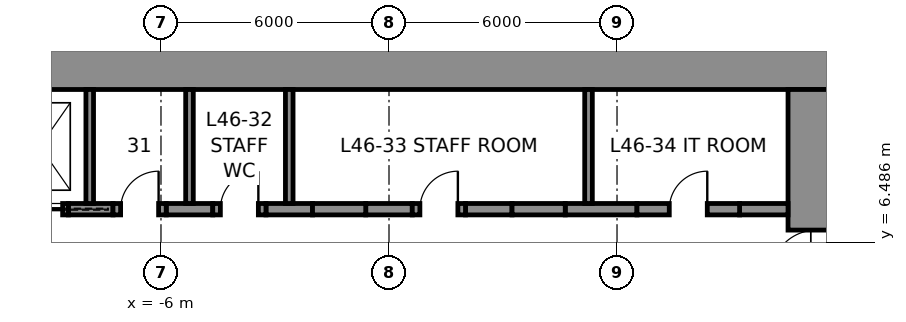
"""IFC4 building model, lengths in metres.
Left out: names, types, materials, properties, quantities, classifications, styles, units other than length and angle.
Written with IfcOpenShell. Run it as: python <this file> out.ifc"""

import sys

from ifc_helpers import new_model, si_unit, direction, frame, frame_2d, origin, place, context, subcontext, project, spatial, rectangle, extrude, element, fill, save


model = new_model("IFC4")
c1 = context("Model", 3, precision=1e-05, world=origin(), true_north=direction((0.0, 1.0)))
c2 = subcontext(c1, "Body", "Model", "MODEL_VIEW")
j1 = project(units=[si_unit("LENGTHUNIT", "METRE"), si_unit("PLANEANGLEUNIT", "RADIAN")], contexts=[c1])
p1 = place(None, origin())
s1 = spatial("IfcSite", under=j1, at=p1, CompositionType="ELEMENT")
p2 = place(p1, origin())
s2 = spatial("IfcBuilding", under=s1, at=p2, CompositionType="ELEMENT")
p3 = place(p2, frame((0.0, 0.0, 213.8)))
s3 = spatial("IfcBuildingStorey", under=s2, at=p3, CompositionType="ELEMENT", Elevation=213.8)
p4 = place(p3, frame((-12.0, 11.25, 0.0), z_axis=(0.0, 0.0, 1.0), x_axis=(1.0, 0.0, 0.0)))
e1 = element("IfcWall", 1, at=p4, inside=s3, PredefinedType="SHEAR", context=c2, shape_type="SweptSolid", body=[
    extrude(rectangle(XDim=24.0, YDim=1.5, at=frame_2d((12.0, 0.0))), origin(), (0.0, 0.0, 1.0), 4.0),
])
p5 = place(p3, frame((11.25, 10.5, 0.0), z_axis=(0.0, 0.0, 1.0), x_axis=(0.0, -1.0, 0.0)))
e2 = element("IfcWall", 2, at=p5, inside=s3, PredefinedType="SHEAR", context=c2, shape_type="SweptSolid", body=[
    extrude(rectangle(XDim=21.0, YDim=1.5, at=frame_2d((10.5, 0.0))), origin(), (0.0, 0.0, 1.0), 4.0),
])
p6 = place(p5, frame((3.7, 0.0, 0.0)))
e3 = element("IfcOpeningElement", 3, at=p6, cuts=e2, PredefinedType="OPENING", context=c2, shape_type="SweptSolid", body=[
    extrude(rectangle(XDim=1.2, YDim=2.3, at=frame_2d((0.6, 1.15))), frame((0.0, 0.76, 0.0), z_axis=(0.0, -1.0, 0.0), x_axis=(1.0, 0.0, 0.0)), (0.0, 0.0, 1.0), 1.52),
])
p7 = place(p5, frame((16.1, 0.0, 0.0)))
e4 = element("IfcOpeningElement", 4, at=p7, cuts=e2, PredefinedType="OPENING", context=c2, shape_type="SweptSolid", body=[
    extrude(rectangle(XDim=1.2, YDim=2.3, at=frame_2d((0.6, 1.15))), frame((0.0, 0.76, 0.0), z_axis=(0.0, -1.0, 0.0), x_axis=(1.0, 0.0, 0.0)), (0.0, 0.0, 1.0), 1.52),
])
p8 = place(p3, frame((-8.438, 7.35, 0.0), z_axis=(0.0, 0.0, 1.0), x_axis=(1.0, 0.0, 0.0)))
e5 = element("IfcWall", 5, at=p8, inside=s3, PredefinedType="SHEAR", context=c2, shape_type="SweptSolid", body=[
    extrude(rectangle(XDim=1.175, YDim=0.3, at=frame_2d((0.587, 0.0))), origin(), (0.0, 0.0, 1.0), 4.0),
])
for number, where, z_axis, x_axis in (
    (6, (-5.863, 7.35, 0.0), (0.0, 0.0, 1.0), (1.0, 0.0, 0.0)),
    (7, (-3.238, 7.35, 0.0), (0.0, 0.0, 1.0), (1.0, 0.0, 0.0)),
    (8, (-0.613, 7.35, 0.0), (0.0, 0.0, 1.0), (1.0, 0.0, 0.0)),
    (9, (2.012, 7.35, 0.0), (0.0, 0.0, 1.0), (1.0, 0.0, 0.0)),
):
    element("IfcWall", number, at=place(p3, frame(where, z_axis=z_axis, x_axis=x_axis)), inside=s3, PredefinedType="SHEAR", context=c2, shape_type="SweptSolid", body=[
        extrude(rectangle(XDim=1.225, YDim=0.3, at=frame_2d((0.613, 0.0))), origin(), (0.0, 0.0, 1.0), 4.0),
    ])
p9 = place(p3, frame((4.637, 7.35, 0.0), z_axis=(0.0, 0.0, 1.0), x_axis=(1.0, 0.0, 0.0)))
e10 = element("IfcWall", 10, at=p9, inside=s3, PredefinedType="SHEAR", context=c2, shape_type="SweptSolid", body=[
    extrude(rectangle(XDim=1.887, YDim=0.3, at=frame_2d((0.944, 0.0))), origin(), (0.0, 0.0, 1.0), 4.0),
])
p10 = place(p3, frame((9.225, 7.35, 0.0), z_axis=(0.0, 0.0, 1.0), x_axis=(1.0, 0.0, 0.0)))
e11 = element("IfcWall", 11, at=p10, inside=s3, PredefinedType="SHEAR", context=c2, shape_type="SweptSolid", body=[
    extrude(rectangle(XDim=1.275, YDim=0.3, at=frame_2d((0.637, 0.0))), origin(), (0.0, 0.0, 1.0), 4.0),
])
p11 = place(p3, frame((-9.938, 7.35, 0.0), z_axis=(0.0, 0.0, 1.0), x_axis=(1.0, 0.0, 0.0)))
e12 = element("IfcWall", 12, at=p11, inside=s3, PredefinedType="PARTITIONING", context=c2, shape_type="SweptSolid", body=[
    extrude(rectangle(XDim=1.5, YDim=0.3, at=frame_2d((0.75, 0.0))), origin(), (0.0, 0.0, 1.0), 4.0),
])
p12 = place(p11, frame((0.15, 0.0, 0.0)))
e13 = element("IfcOpeningElement", 13, at=p12, cuts=e12, PredefinedType="OPENING", context=c2, shape_type="SweptSolid", body=[
    extrude(rectangle(XDim=1.2, YDim=2.3, at=frame_2d((0.6, 1.15))), frame((0.0, 0.16, 0.0), z_axis=(0.0, -1.0, 0.0), x_axis=(1.0, 0.0, 0.0)), (0.0, 0.0, 1.0), 0.32),
])
p13 = place(p3, frame((-7.262, 7.35, 0.0), z_axis=(0.0, 0.0, 1.0), x_axis=(1.0, 0.0, 0.0)))
e14 = element("IfcWall", 14, at=p13, inside=s3, PredefinedType="PARTITIONING", context=c2, shape_type="SweptSolid", body=[
    extrude(rectangle(XDim=1.4, YDim=0.3, at=frame_2d((0.7, 0.0))), origin(), (0.0, 0.0, 1.0), 4.0),
])
p14 = place(p13, frame((0.2, 0.0, 0.0)))
e15 = element("IfcOpeningElement", 15, at=p14, cuts=e14, PredefinedType="OPENING", context=c2, shape_type="SweptSolid", body=[
    extrude(rectangle(XDim=1.0, YDim=2.3, at=frame_2d((0.5, 1.15))), frame((0.0, 0.16, 0.0), z_axis=(0.0, -1.0, 0.0), x_axis=(1.0, 0.0, 0.0)), (0.0, 0.0, 1.0), 0.32),
])
p15 = place(p3, frame((-4.637, 7.35, 0.0), z_axis=(0.0, 0.0, 1.0), x_axis=(1.0, 0.0, 0.0)))
e16 = element("IfcWall", 16, at=p15, inside=s3, PredefinedType="PARTITIONING", context=c2, shape_type="SweptSolid", body=[
    extrude(rectangle(XDim=1.4, YDim=0.3, at=frame_2d((0.7, 0.0))), origin(), (0.0, 0.0, 1.0), 4.0),
])
p16 = place(p15, frame((0.2, 0.0, 0.0)))
e17 = element("IfcOpeningElement", 17, at=p16, cuts=e16, PredefinedType="OPENING", context=c2, shape_type="SweptSolid", body=[
    extrude(rectangle(XDim=1.0, YDim=2.3, at=frame_2d((0.5, 1.15))), frame((0.0, 0.16, 0.0), z_axis=(0.0, -1.0, 0.0), x_axis=(1.0, 0.0, 0.0)), (0.0, 0.0, 1.0), 0.32),
])
p17 = place(p3, frame((-2.012, 7.35, 0.0), z_axis=(0.0, 0.0, 1.0), x_axis=(1.0, 0.0, 0.0)))
e18 = element("IfcWall", 18, at=p17, inside=s3, PredefinedType="PARTITIONING", context=c2, shape_type="SweptSolid", body=[
    extrude(rectangle(XDim=1.4, YDim=0.3, at=frame_2d((0.7, 0.0))), origin(), (0.0, 0.0, 1.0), 4.0),
])
p18 = place(p3, frame((0.613, 7.35, 0.0), z_axis=(0.0, 0.0, 1.0), x_axis=(1.0, 0.0, 0.0)))
e19 = element("IfcWall", 19, at=p18, inside=s3, PredefinedType="PARTITIONING", context=c2, shape_type="SweptSolid", body=[
    extrude(rectangle(XDim=1.4, YDim=0.3, at=frame_2d((0.7, 0.0))), origin(), (0.0, 0.0, 1.0), 4.0),
])
p19 = place(p18, frame((0.2, 0.0, 0.0)))
e20 = element("IfcOpeningElement", 20, at=p19, cuts=e19, PredefinedType="OPENING", context=c2, shape_type="SweptSolid", body=[
    extrude(rectangle(XDim=1.0, YDim=2.3, at=frame_2d((0.5, 1.15))), frame((0.0, 0.16, 0.0), z_axis=(0.0, -1.0, 0.0), x_axis=(1.0, 0.0, 0.0)), (0.0, 0.0, 1.0), 0.32),
])
p20 = place(p3, frame((3.238, 7.35, 0.0), z_axis=(0.0, 0.0, 1.0), x_axis=(1.0, 0.0, 0.0)))
e21 = element("IfcWall", 21, at=p20, inside=s3, PredefinedType="PARTITIONING", context=c2, shape_type="SweptSolid", body=[
    extrude(rectangle(XDim=1.4, YDim=0.3, at=frame_2d((0.7, 0.0))), origin(), (0.0, 0.0, 1.0), 4.0),
])
p21 = place(p3, frame((6.525, 7.35, 0.0), z_axis=(0.0, 0.0, 1.0), x_axis=(1.0, 0.0, 0.0)))
e22 = element("IfcWall", 22, at=p21, inside=s3, PredefinedType="PARTITIONING", context=c2, shape_type="SweptSolid", body=[
    extrude(rectangle(XDim=2.7, YDim=0.3, at=frame_2d((1.35, 0.0))), origin(), (0.0, 0.0, 1.0), 4.0),
])
p22 = place(p21, frame((0.85, 0.0, 0.0)))
e23 = element("IfcOpeningElement", 23, at=p22, cuts=e22, PredefinedType="OPENING", context=c2, shape_type="SweptSolid", body=[
    extrude(rectangle(XDim=1.0, YDim=2.3, at=frame_2d((0.5, 1.15))), frame((0.0, 0.16, 0.0), z_axis=(0.0, -1.0, 0.0), x_axis=(1.0, 0.0, 0.0)), (0.0, 0.0, 1.0), 0.32),
])
for number, where, z_axis, x_axis in (
    (24, (-7.875, 7.5, 0.0), (0.0, 0.0, 1.0), (0.0, 1.0, 0.0)),
    (25, (-5.25, 7.5, 0.0), (0.0, 0.0, 1.0), (0.0, 1.0, 0.0)),
    (26, (-2.625, 7.5, 0.0), (0.0, 0.0, 1.0), (0.0, 1.0, 0.0)),
    (27, (5.25, 7.5, 0.0), (0.0, 0.0, 1.0), (0.0, 1.0, 0.0)),
):
    element("IfcWall", number, at=place(p3, frame(where, z_axis=z_axis, x_axis=x_axis)), inside=s3, PredefinedType="PARTITIONING", context=c2, shape_type="SweptSolid", body=[
        extrude(rectangle(XDim=3.0, YDim=0.2, at=frame_2d((1.5, 0.0))), origin(), (0.0, 0.0, 1.0), 4.0),
    ])
p23 = place(p14, origin())
e28 = element("IfcDoor", 28, at=p23, inside=s3, OperationType="SINGLE_SWING_RIGHT", PredefinedType="DOOR", context=c2, shape_type="SweptSolid", body=[
    extrude(rectangle(XDim=1.0, YDim=2.3, at=frame_2d((0.5, 1.15))), frame((0.0, 0.025, 0.0), z_axis=(0.0, -1.0, 0.0), x_axis=(1.0, 0.0, 0.0)), (0.0, 0.0, 1.0), 0.05),
])
fill(e15, e28)
p24 = place(p16, origin())
e29 = element("IfcDoor", 29, at=p24, inside=s3, OperationType="SINGLE_SWING_RIGHT", PredefinedType="DOOR", context=c2, shape_type="SweptSolid", body=[
    extrude(rectangle(XDim=1.0, YDim=2.3, at=frame_2d((0.5, 1.15))), frame((0.0, 0.025, 0.0), z_axis=(0.0, -1.0, 0.0), x_axis=(1.0, 0.0, 0.0)), (0.0, 0.0, 1.0), 0.05),
])
fill(e17, e29)
p25 = place(p19, origin())
e30 = element("IfcDoor", 30, at=p25, inside=s3, OperationType="SINGLE_SWING_RIGHT", PredefinedType="DOOR", context=c2, shape_type="SweptSolid", body=[
    extrude(rectangle(XDim=1.0, YDim=2.3, at=frame_2d((0.5, 1.15))), frame((0.0, 0.025, 0.0), z_axis=(0.0, -1.0, 0.0), x_axis=(1.0, 0.0, 0.0)), (0.0, 0.0, 1.0), 0.05),
])
fill(e20, e30)
p26 = place(p22, origin())
e31 = element("IfcDoor", 31, at=p26, inside=s3, OperationType="SINGLE_SWING_RIGHT", PredefinedType="DOOR", context=c2, shape_type="SweptSolid", body=[
    extrude(rectangle(XDim=1.0, YDim=2.3, at=frame_2d((0.5, 1.15))), frame((0.0, 0.025, 0.0), z_axis=(0.0, -1.0, 0.0), x_axis=(1.0, 0.0, 0.0)), (0.0, 0.0, 1.0), 0.05),
])
fill(e23, e31)
p27 = place(p6, frame((1.2, 0.0, 0.0), z_axis=(0.0, 0.0, 1.0), x_axis=(-1.0, 0.0, 0.0)))
e32 = element("IfcDoor", 32, at=p27, inside=s3, OperationType="SINGLE_SWING_LEFT", PredefinedType="DOOR", context=c2, shape_type="SweptSolid", body=[
    extrude(rectangle(XDim=1.2, YDim=2.3, at=frame_2d((0.6, 1.15))), frame((0.0, 0.025, 0.0), z_axis=(0.0, -1.0, 0.0), x_axis=(1.0, 0.0, 0.0)), (0.0, 0.0, 1.0), 0.05),
])
fill(e3, e32)
p28 = place(p12, frame((1.2, 0.0, 0.0), z_axis=(0.0, 0.0, 1.0), x_axis=(-1.0, 0.0, 0.0)))
e33 = element("IfcDoor", 33, at=p28, inside=s3, OperationType="SLIDING_TO_LEFT", PredefinedType="DOOR", context=c2, shape_type="SweptSolid", body=[
    extrude(rectangle(XDim=1.2, YDim=2.3, at=frame_2d((0.6, 1.15))), frame((0.0, 0.025, 0.0), z_axis=(0.0, -1.0, 0.0), x_axis=(1.0, 0.0, 0.0)), (0.0, 0.0, 1.0), 0.05),
])
fill(e13, e33)
save(model, sys.argv[1])
